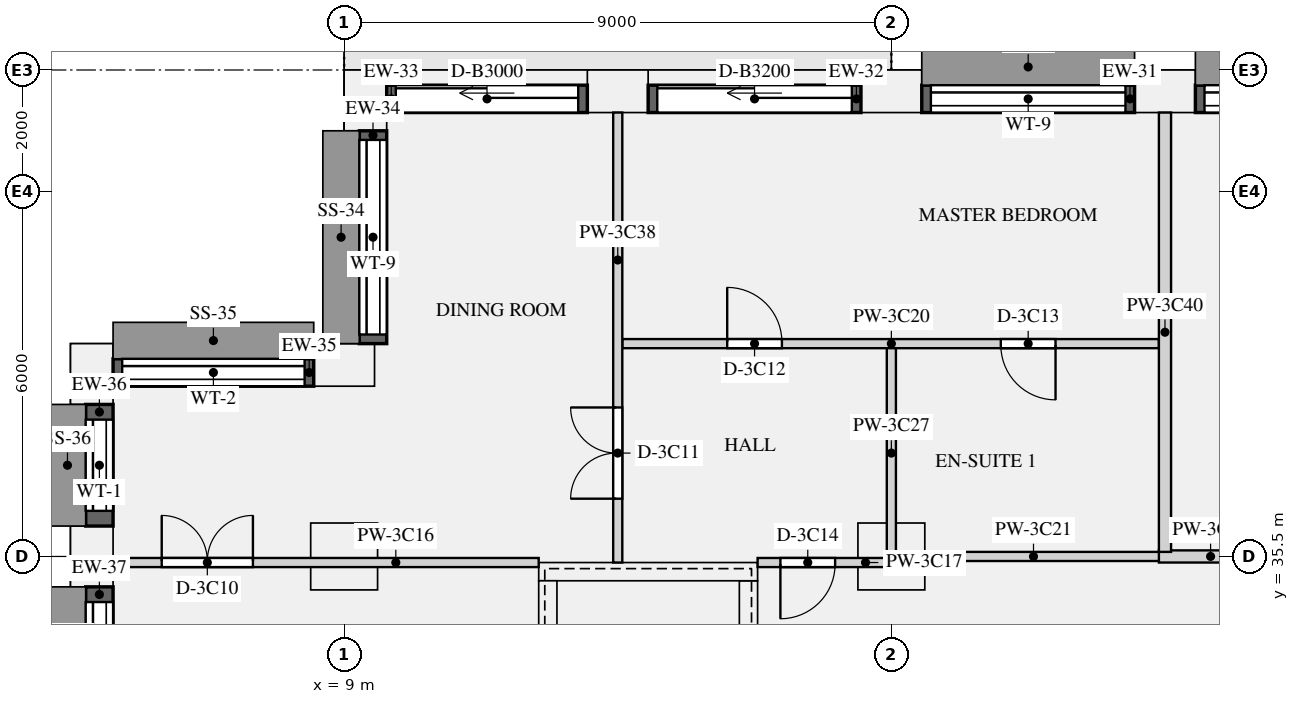
"""IFC4 building model, lengths in metres.
Left out: names, types, materials, properties, quantities, classifications, styles, units other than length and angle.
Written with IfcOpenShell. Run it as: python <this file> out.ifc"""

import sys

from ifc_helpers import new_model, si_unit, direction, frame, frame_2d, origin, origin_2d, place, context, subcontext, project, spatial, rectangle, extrude, element, fill, save


model = new_model("IFC4")
c1 = context("Model", 3, precision=1e-05, world=origin(), true_north=direction((0.0, 1.0)))
c2 = subcontext(c1, "Body", "Model", "MODEL_VIEW")
j1 = project(units=[si_unit("LENGTHUNIT", "METRE"), si_unit("PLANEANGLEUNIT", "RADIAN")], contexts=[c1])
p1 = place(None, origin())
s1 = spatial("IfcSite", under=j1, at=p1, CompositionType="ELEMENT")
p2 = place(p1, origin())
s2 = spatial("IfcBuilding", under=s1, at=p2, CompositionType="ELEMENT")
p3 = place(p2, frame((0.0, 0.0, 160.2)))
s3 = spatial("IfcBuildingStorey", under=s2, at=p3, CompositionType="ELEMENT", Elevation=160.2)
for number, where, z_axis, x_axis in (
    (1, (22.5, 43.15, 0.0), (0.0, 0.0, 1.0), (-1.0, 0.0, 0.0)),
    (2, (18.0, 43.15, 0.0), (0.0, 0.0, 1.0), (-1.0, 0.0, 0.0)),
    (3, (13.5, 43.15, 0.0), (0.0, 0.0, 1.0), (-1.0, 0.0, 0.0)),
    (4, (9.35, 43.0, 0.0), (0.0, 0.0, 1.0), (0.0, -1.0, 0.0)),
    (5, (9.0, 38.65, 0.0), (0.0, 0.0, 1.0), (-1.0, 0.0, 0.0)),
    (6, (4.85, 38.5, 0.0), (0.0, 0.0, 1.0), (0.0, -1.0, 0.0)),
    (7, (4.85, 35.5, 0.0), (0.0, 0.0, 1.0), (0.0, -1.0, 0.0)),
):
    element("IfcColumn", number, at=place(p3, frame(where, z_axis=z_axis, x_axis=x_axis)), inside=s3, PredefinedType="USERDEFINED", context=c2, shape_type="SweptSolid", body=[
        extrude(rectangle(XDim=1.0, YDim=0.7, at=origin_2d()), origin(), (0.0, 0.0, 1.0), 3.15),
    ])
for number, where, z_axis, x_axis in (
    (8, (9.0, 35.5, 0.0), (0.0, 0.0, 1.0), (1.0, 0.0, 0.0)),
    (9, (18.0, 35.5, 0.0), (0.0, 0.0, 1.0), (1.0, 0.0, 0.0)),
):
    element("IfcColumn", number, at=place(p3, frame(where, z_axis=z_axis, x_axis=x_axis)), inside=s3, PredefinedType="COLUMN", context=c2, shape_type="SweptSolid", body=[
        extrude(rectangle(XDim=1.1, YDim=1.1, at=origin_2d()), origin(), (0.0, 0.0, 1.0), 3.15),
    ])
p4 = place(p3, frame((12.2, 35.25, 0.0), z_axis=(0.0, 0.0, 1.0), x_axis=(1.0, 0.0, 0.0)))
e10 = element("IfcWall", 10, at=p4, inside=s3, PredefinedType="SHEAR", context=c2, shape_type="SweptSolid", body=[
    extrude(rectangle(XDim=3.6, YDim=0.3, at=frame_2d((1.8, 0.0))), origin(), (0.0, 0.0, 1.0), 3.15),
])
for number, where, z_axis, x_axis in (
    (11, (12.35, 27.3, 0.0), (0.0, 0.0, 1.0), (0.0, 1.0, 0.0)),
    (12, (15.65, 27.3, 0.0), (0.0, 0.0, 1.0), (0.0, 1.0, 0.0)),
):
    element("IfcWall", number, at=place(p3, frame(where, z_axis=z_axis, x_axis=x_axis)), inside=s3, PredefinedType="SHEAR", context=c2, shape_type="SweptSolid", body=[
        extrude(rectangle(XDim=7.8, YDim=0.3, at=frame_2d((3.9, 0.0))), origin(), (0.0, 0.0, 1.0), 3.15),
    ])
p5 = place(p3, frame((26.5, 43.025, 0.9), z_axis=(0.0, 0.0, 1.0), x_axis=(-1.0, 0.0, 0.0)))
e13 = element("IfcWall", 13, at=p5, inside=s3, PredefinedType="SOLIDWALL", context=c2, shape_type="SweptSolid", body=[
    extrude(rectangle(XDim=3.5, YDim=0.45, at=frame_2d((1.75, 0.0))), origin(), (0.0, 0.0, 1.0), 1.93),
])
p6 = place(p5, frame((0.15, 0.0, 0.15)))
e14 = element("IfcOpeningElement", 14, at=p6, cuts=e13, PredefinedType="OPENING", context=c2, shape_type="SweptSolid", body=[
    extrude(rectangle(XDim=3.2, YDim=1.5, at=frame_2d((1.6, 0.75))), frame((0.0, 0.235, 0.0), z_axis=(0.0, -1.0, 0.0), x_axis=(1.0, 0.0, 0.0)), (0.0, 0.0, 1.0), 0.47),
])
p7 = place(p3, frame((22.0, 43.025, 0.9), z_axis=(0.0, 0.0, 1.0), x_axis=(-1.0, 0.0, 0.0)))
e15 = element("IfcWall", 15, at=p7, inside=s3, PredefinedType="SOLIDWALL", context=c2, shape_type="SweptSolid", body=[
    extrude(rectangle(XDim=3.5, YDim=0.45, at=frame_2d((1.75, 0.0))), origin(), (0.0, 0.0, 1.0), 1.93),
])
p8 = place(p7, frame((0.15, 0.0, 0.15)))
e16 = element("IfcOpeningElement", 16, at=p8, cuts=e15, PredefinedType="OPENING", context=c2, shape_type="SweptSolid", body=[
    extrude(rectangle(XDim=3.2, YDim=1.5, at=frame_2d((1.6, 0.75))), frame((0.0, 0.235, 0.0), z_axis=(0.0, -1.0, 0.0), x_axis=(1.0, 0.0, 0.0)), (0.0, 0.0, 1.0), 0.47),
])
p9 = place(p3, frame((17.5, 43.025, 0.0), z_axis=(0.0, 0.0, 1.0), x_axis=(-1.0, 0.0, 0.0)))
e17 = element("IfcWall", 17, at=p9, inside=s3, PredefinedType="SOLIDWALL", context=c2, shape_type="SweptSolid", body=[
    extrude(rectangle(XDim=3.5, YDim=0.45, at=frame_2d((1.75, 0.0))), origin(), (0.0, 0.0, 1.0), 2.83),
])
p10 = place(p9, frame((0.15, 0.0, 0.0)))
e18 = element("IfcOpeningElement", 18, at=p10, cuts=e17, PredefinedType="OPENING", context=c2, shape_type="SweptSolid", body=[
    extrude(rectangle(XDim=3.2, YDim=2.3, at=frame_2d((1.6, 1.15))), frame((0.0, 0.235, 0.0), z_axis=(0.0, -1.0, 0.0), x_axis=(1.0, 0.0, 0.0)), (0.0, 0.0, 1.0), 0.47),
])
p11 = place(p3, frame((13.0, 43.025, 0.0), z_axis=(0.0, 0.0, 1.0), x_axis=(-1.0, 0.0, 0.0)))
e19 = element("IfcWall", 19, at=p11, inside=s3, PredefinedType="SOLIDWALL", context=c2, shape_type="SweptSolid", body=[
    extrude(rectangle(XDim=3.3, YDim=0.45, at=frame_2d((1.65, 0.0))), origin(), (0.0, 0.0, 1.0), 2.83),
])
p12 = place(p11, frame((0.15, 0.0, 0.0)))
e20 = element("IfcOpeningElement", 20, at=p12, cuts=e19, PredefinedType="OPENING", context=c2, shape_type="SweptSolid", body=[
    extrude(rectangle(XDim=3.0, YDim=2.3, at=frame_2d((1.5, 1.15))), frame((0.0, 0.235, 0.0), z_axis=(0.0, -1.0, 0.0), x_axis=(1.0, 0.0, 0.0)), (0.0, 0.0, 1.0), 0.47),
])
p13 = place(p3, frame((9.475, 42.5, 0.9), z_axis=(0.0, 0.0, 1.0), x_axis=(0.0, -1.0, 0.0)))
e21 = element("IfcWall", 21, at=p13, inside=s3, PredefinedType="SOLIDWALL", context=c2, shape_type="SweptSolid", body=[
    extrude(rectangle(XDim=3.5, YDim=0.45, at=frame_2d((1.75, 0.0))), origin(), (0.0, 0.0, 1.0), 1.93),
])
p14 = place(p13, frame((0.15, 0.0, 0.15)))
e22 = element("IfcOpeningElement", 22, at=p14, cuts=e21, PredefinedType="OPENING", context=c2, shape_type="SweptSolid", body=[
    extrude(rectangle(XDim=3.2, YDim=1.5, at=frame_2d((1.6, 0.75))), frame((0.0, 0.235, 0.0), z_axis=(0.0, -1.0, 0.0), x_axis=(1.0, 0.0, 0.0)), (0.0, 0.0, 1.0), 0.47),
])
p15 = place(p3, frame((8.5, 38.525, 0.9), z_axis=(0.0, 0.0, 1.0), x_axis=(-1.0, 0.0, 0.0)))
e23 = element("IfcWall", 23, at=p15, inside=s3, PredefinedType="SOLIDWALL", context=c2, shape_type="SweptSolid", body=[
    extrude(rectangle(XDim=3.3, YDim=0.45, at=frame_2d((1.65, 0.0))), origin(), (0.0, 0.0, 1.0), 1.93),
])
p16 = place(p15, frame((0.15, 0.0, 0.15)))
e24 = element("IfcOpeningElement", 24, at=p16, cuts=e23, PredefinedType="OPENING", context=c2, shape_type="SweptSolid", body=[
    extrude(rectangle(XDim=3.0, YDim=1.5, at=frame_2d((1.5, 0.75))), frame((0.0, 0.235, 0.0), z_axis=(0.0, -1.0, 0.0), x_axis=(1.0, 0.0, 0.0)), (0.0, 0.0, 1.0), 0.47),
])
p17 = place(p3, frame((4.975, 38.0, 0.9), z_axis=(0.0, 0.0, 1.0), x_axis=(0.0, -1.0, 0.0)))
e25 = element("IfcWall", 25, at=p17, inside=s3, PredefinedType="SOLIDWALL", context=c2, shape_type="SweptSolid", body=[
    extrude(rectangle(XDim=2.0, YDim=0.45, at=frame_2d((1.0, 0.0))), origin(), (0.0, 0.0, 1.0), 1.93),
])
p18 = place(p17, frame((0.25, 0.0, 0.15)))
e26 = element("IfcOpeningElement", 26, at=p18, cuts=e25, PredefinedType="OPENING", context=c2, shape_type="SweptSolid", body=[
    extrude(rectangle(XDim=1.5, YDim=1.5, at=frame_2d((0.75, 0.75))), frame((0.0, 0.235, 0.0), z_axis=(0.0, -1.0, 0.0), x_axis=(1.0, 0.0, 0.0)), (0.0, 0.0, 1.0), 0.47),
])
p19 = place(p3, frame((4.975, 35.0, 0.9), z_axis=(0.0, 0.0, 1.0), x_axis=(0.0, -1.0, 0.0)))
e27 = element("IfcWall", 27, at=p19, inside=s3, PredefinedType="SOLIDWALL", context=c2, shape_type="SweptSolid", body=[
    extrude(rectangle(XDim=2.5, YDim=0.45, at=frame_2d((1.25, 0.0))), origin(), (0.0, 0.0, 1.0), 1.93),
])
p20 = place(p19, frame((0.25, 0.0, 0.15)))
e28 = element("IfcOpeningElement", 28, at=p20, cuts=e27, PredefinedType="OPENING", context=c2, shape_type="SweptSolid", body=[
    extrude(rectangle(XDim=2.0, YDim=1.5, at=frame_2d((1.0, 0.75))), frame((0.0, 0.235, 0.0), z_axis=(0.0, -1.0, 0.0), x_axis=(1.0, 0.0, 0.0)), (0.0, 0.0, 1.0), 0.47),
])
p21 = place(p3, frame((5.2, 35.4, 0.0), z_axis=(0.0, 0.0, 1.0), x_axis=(1.0, 0.0, 0.0)))
e29 = element("IfcWall", 29, at=p21, inside=s3, PredefinedType="PARTITIONING", context=c2, shape_type="SweptSolid", body=[
    extrude(rectangle(XDim=7.0, YDim=0.15, at=frame_2d((3.5, 0.0))), origin(), (0.0, 0.0, 1.0), 2.83),
])
p22 = place(p21, frame((0.8, 0.0, 0.0)))
e30 = element("IfcOpeningElement", 30, at=p22, cuts=e29, PredefinedType="OPENING", context=c2, shape_type="SweptSolid", body=[
    extrude(rectangle(XDim=1.5, YDim=2.1, at=frame_2d((0.75, 1.05))), frame((0.0, 0.085, 0.0), z_axis=(0.0, -1.0, 0.0), x_axis=(1.0, 0.0, 0.0)), (0.0, 0.0, 1.0), 0.17),
])
p23 = place(p3, frame((15.8, 35.4, 0.0), z_axis=(0.0, 0.0, 1.0), x_axis=(1.0, 0.0, 0.0)))
e31 = element("IfcWall", 31, at=p23, inside=s3, PredefinedType="PARTITIONING", context=c2, shape_type="SweptSolid", body=[
    extrude(rectangle(XDim=2.275, YDim=0.15, at=frame_2d((1.137, 0.0))), origin(), (0.0, 0.0, 1.0), 2.83),
])
p24 = place(p23, frame((0.375, 0.0, 0.0)))
e32 = element("IfcOpeningElement", 32, at=p24, cuts=e31, PredefinedType="OPENING", context=c2, shape_type="SweptSolid", body=[
    extrude(rectangle(XDim=0.9, YDim=2.1, at=frame_2d((0.45, 1.05))), frame((0.0, 0.085, 0.0), z_axis=(0.0, -1.0, 0.0), x_axis=(1.0, 0.0, 0.0)), (0.0, 0.0, 1.0), 0.17),
])
p25 = place(p3, frame((13.575, 39.0, 0.0), z_axis=(0.0, 0.0, 1.0), x_axis=(1.0, 0.0, 0.0)))
e33 = element("IfcWall", 33, at=p25, inside=s3, PredefinedType="PARTITIONING", context=c2, shape_type="SweptSolid", body=[
    extrude(rectangle(XDim=8.825, YDim=0.15, at=frame_2d((4.413, 0.0))), origin(), (0.0, 0.0, 1.0), 2.83),
])
p26 = place(p25, frame((1.725, 0.0, 0.0)))
e34 = element("IfcOpeningElement", 34, at=p26, cuts=e33, PredefinedType="OPENING", context=c2, shape_type="SweptSolid", body=[
    extrude(rectangle(XDim=0.9, YDim=2.1, at=frame_2d((0.45, 1.05))), frame((0.0, 0.085, 0.0), z_axis=(0.0, -1.0, 0.0), x_axis=(1.0, 0.0, 0.0)), (0.0, 0.0, 1.0), 0.17),
])
p27 = place(p25, frame((6.225, 0.0, 0.0)))
e35 = element("IfcOpeningElement", 35, at=p27, cuts=e33, PredefinedType="OPENING", context=c2, shape_type="SweptSolid", body=[
    extrude(rectangle(XDim=0.9, YDim=2.1, at=frame_2d((0.45, 1.05))), frame((0.0, 0.085, 0.0), z_axis=(0.0, -1.0, 0.0), x_axis=(1.0, 0.0, 0.0)), (0.0, 0.0, 1.0), 0.17),
])
p28 = place(p3, frame((18.075, 35.5, 0.0), z_axis=(0.0, 0.0, 1.0), x_axis=(1.0, 0.0, 0.0)))
e36 = element("IfcWall", 36, at=p28, inside=s3, PredefinedType="PARTITIONING", context=c2, shape_type="SweptSolid", body=[
    extrude(rectangle(XDim=4.525, YDim=0.15, at=frame_2d((2.263, 0.0))), origin(), (0.0, 0.0, 1.0), 2.83),
])
p29 = place(p3, frame((22.4, 35.5, 0.0), z_axis=(0.0, 0.0, 1.0), x_axis=(1.0, 0.0, 0.0)))
e37 = element("IfcWall", 37, at=p29, inside=s3, PredefinedType="PARTITIONING", context=c2, shape_type="SweptSolid", body=[
    extrude(rectangle(XDim=1.7, YDim=0.2, at=frame_2d((0.85, 0.0))), origin(), (0.0, 0.0, 1.0), 2.83),
])
p30 = place(p3, frame((18.0, 35.475, 0.0), z_axis=(0.0, 0.0, 1.0), x_axis=(0.0, 1.0, 0.0)))
e38 = element("IfcWall", 38, at=p30, inside=s3, PredefinedType="PARTITIONING", context=c2, shape_type="SweptSolid", body=[
    extrude(rectangle(XDim=3.45, YDim=0.15, at=frame_2d((1.725, 0.0))), origin(), (0.0, 0.0, 1.0), 2.83),
])
p31 = place(p3, frame((13.5, 35.4, 0.0), z_axis=(0.0, 0.0, 1.0), x_axis=(0.0, 1.0, 0.0)))
e39 = element("IfcWall", 39, at=p31, inside=s3, PredefinedType="PARTITIONING", context=c2, shape_type="SweptSolid", body=[
    extrude(rectangle(XDim=7.4, YDim=0.15, at=frame_2d((3.7, 0.0))), origin(), (0.0, 0.0, 1.0), 2.83),
])
p32 = place(p31, frame((1.05, 0.0, 0.0)))
e40 = element("IfcOpeningElement", 40, at=p32, cuts=e39, PredefinedType="OPENING", context=c2, shape_type="SweptSolid", body=[
    extrude(rectangle(XDim=1.5, YDim=2.1, at=frame_2d((0.75, 1.05))), frame((0.0, 0.085, 0.0), z_axis=(0.0, -1.0, 0.0), x_axis=(1.0, 0.0, 0.0)), (0.0, 0.0, 1.0), 0.17),
])
p33 = place(p3, frame((22.5, 35.575, 0.0), z_axis=(0.0, 0.0, 1.0), x_axis=(0.0, 1.0, 0.0)))
e41 = element("IfcWall", 41, at=p33, inside=s3, PredefinedType="PARTITIONING", context=c2, shape_type="SweptSolid", body=[
    extrude(rectangle(XDim=7.225, YDim=0.2, at=frame_2d((3.613, 0.0))), origin(), (0.0, 0.0, 1.0), 2.83),
])
p34 = place(p6, origin())
e42 = element("IfcWindow", 42, at=p34, inside=s3, PartitioningType="SINGLE_PANEL", PredefinedType="WINDOW", context=c2, shape_type="SweptSolid", body=[
    extrude(rectangle(XDim=3.2, YDim=1.5, at=frame_2d((1.6, 0.75))), frame((0.0, -0.065, 0.0), z_axis=(0.0, -1.0, 0.0), x_axis=(1.0, 0.0, 0.0)), (0.0, 0.0, 1.0), 0.06),
])
fill(e14, e42)
p35 = place(p8, origin())
e43 = element("IfcWindow", 43, at=p35, inside=s3, PartitioningType="SINGLE_PANEL", PredefinedType="WINDOW", context=c2, shape_type="SweptSolid", body=[
    extrude(rectangle(XDim=3.2, YDim=1.5, at=frame_2d((1.6, 0.75))), frame((0.0, -0.065, 0.0), z_axis=(0.0, -1.0, 0.0), x_axis=(1.0, 0.0, 0.0)), (0.0, 0.0, 1.0), 0.06),
])
fill(e16, e43)
p36 = place(p10, origin())
e44 = element("IfcDoor", 44, at=p36, inside=s3, OperationType="SLIDING_TO_LEFT", PredefinedType="DOOR", context=c2, shape_type="SweptSolid", body=[
    extrude(rectangle(XDim=3.2, YDim=2.3, at=frame_2d((1.6, 1.15))), frame((0.0, -0.07, 0.0), z_axis=(0.0, -1.0, 0.0), x_axis=(1.0, 0.0, 0.0)), (0.0, 0.0, 1.0), 0.05),
])
fill(e18, e44)
p37 = place(p12, origin())
e45 = element("IfcDoor", 45, at=p37, inside=s3, OperationType="SLIDING_TO_LEFT", PredefinedType="DOOR", context=c2, shape_type="SweptSolid", body=[
    extrude(rectangle(XDim=3.0, YDim=2.3, at=frame_2d((1.5, 1.15))), frame((0.0, -0.07, 0.0), z_axis=(0.0, -1.0, 0.0), x_axis=(1.0, 0.0, 0.0)), (0.0, 0.0, 1.0), 0.05),
])
fill(e20, e45)
p38 = place(p14, origin())
e46 = element("IfcWindow", 46, at=p38, inside=s3, PartitioningType="SINGLE_PANEL", PredefinedType="WINDOW", context=c2, shape_type="SweptSolid", body=[
    extrude(rectangle(XDim=3.2, YDim=1.5, at=frame_2d((1.6, 0.75))), frame((0.0, -0.065, 0.0), z_axis=(0.0, -1.0, 0.0), x_axis=(1.0, 0.0, 0.0)), (0.0, 0.0, 1.0), 0.06),
])
fill(e22, e46)
p39 = place(p16, origin())
e47 = element("IfcWindow", 47, at=p39, inside=s3, PartitioningType="SINGLE_PANEL", PredefinedType="WINDOW", context=c2, shape_type="SweptSolid", body=[
    extrude(rectangle(XDim=3.0, YDim=1.5, at=frame_2d((1.5, 0.75))), frame((0.0, -0.065, 0.0), z_axis=(0.0, -1.0, 0.0), x_axis=(1.0, 0.0, 0.0)), (0.0, 0.0, 1.0), 0.06),
])
fill(e24, e47)
p40 = place(p18, origin())
e48 = element("IfcWindow", 48, at=p40, inside=s3, PartitioningType="SINGLE_PANEL", PredefinedType="WINDOW", context=c2, shape_type="SweptSolid", body=[
    extrude(rectangle(XDim=1.5, YDim=1.5, at=frame_2d((0.75, 0.75))), frame((0.0, -0.065, 0.0), z_axis=(0.0, -1.0, 0.0), x_axis=(1.0, 0.0, 0.0)), (0.0, 0.0, 1.0), 0.06),
])
fill(e26, e48)
p41 = place(p20, origin())
e49 = element("IfcWindow", 49, at=p41, inside=s3, PartitioningType="SINGLE_PANEL", PredefinedType="WINDOW", context=c2, shape_type="SweptSolid", body=[
    extrude(rectangle(XDim=2.0, YDim=1.5, at=frame_2d((1.0, 0.75))), frame((0.0, -0.065, 0.0), z_axis=(0.0, -1.0, 0.0), x_axis=(1.0, 0.0, 0.0)), (0.0, 0.0, 1.0), 0.06),
])
fill(e28, e49)
p42 = place(p22, origin())
e50 = element("IfcDoor", 50, at=p42, inside=s3, OperationType="DOUBLE_DOOR_SINGLE_SWING", PredefinedType="DOOR", context=c2, shape_type="SweptSolid", body=[
    extrude(rectangle(XDim=1.5, YDim=2.1, at=frame_2d((0.75, 1.05))), frame((0.0, 0.025, 0.0), z_axis=(0.0, -1.0, 0.0), x_axis=(1.0, 0.0, 0.0)), (0.0, 0.0, 1.0), 0.05),
])
fill(e30, e50)
p43 = place(p32, origin())
e51 = element("IfcDoor", 51, at=p43, inside=s3, OperationType="DOUBLE_DOOR_SINGLE_SWING", PredefinedType="DOOR", context=c2, shape_type="SweptSolid", body=[
    extrude(rectangle(XDim=1.5, YDim=2.1, at=frame_2d((0.75, 1.05))), frame((0.0, 0.025, 0.0), z_axis=(0.0, -1.0, 0.0), x_axis=(1.0, 0.0, 0.0)), (0.0, 0.0, 1.0), 0.05),
])
fill(e40, e51)
p44 = place(p26, origin())
e52 = element("IfcDoor", 52, at=p44, inside=s3, OperationType="SINGLE_SWING_LEFT", PredefinedType="DOOR", context=c2, shape_type="SweptSolid", body=[
    extrude(rectangle(XDim=0.9, YDim=2.1, at=frame_2d((0.45, 1.05))), frame((0.0, 0.025, 0.0), z_axis=(0.0, -1.0, 0.0), x_axis=(1.0, 0.0, 0.0)), (0.0, 0.0, 1.0), 0.05),
])
fill(e34, e52)
p45 = place(p27, frame((0.9, 0.0, 0.0), z_axis=(0.0, 0.0, 1.0), x_axis=(-1.0, 0.0, 0.0)))
e53 = element("IfcDoor", 53, at=p45, inside=s3, OperationType="SINGLE_SWING_LEFT", PredefinedType="DOOR", context=c2, shape_type="SweptSolid", body=[
    extrude(rectangle(XDim=0.9, YDim=2.1, at=frame_2d((0.45, 1.05))), frame((0.0, 0.025, 0.0), z_axis=(0.0, -1.0, 0.0), x_axis=(1.0, 0.0, 0.0)), (0.0, 0.0, 1.0), 0.05),
])
fill(e35, e53)
p46 = place(p24, frame((0.9, 0.0, 0.0), z_axis=(0.0, 0.0, 1.0), x_axis=(-1.0, 0.0, 0.0)))
e54 = element("IfcDoor", 54, at=p46, inside=s3, OperationType="SINGLE_SWING_RIGHT", PredefinedType="DOOR", context=c2, shape_type="SweptSolid", body=[
    extrude(rectangle(XDim=0.9, YDim=2.1, at=frame_2d((0.45, 1.05))), frame((0.0, 0.025, 0.0), z_axis=(0.0, -1.0, 0.0), x_axis=(1.0, 0.0, 0.0)), (0.0, 0.0, 1.0), 0.05),
])
fill(e32, e54)
save(model, sys.argv[1])
